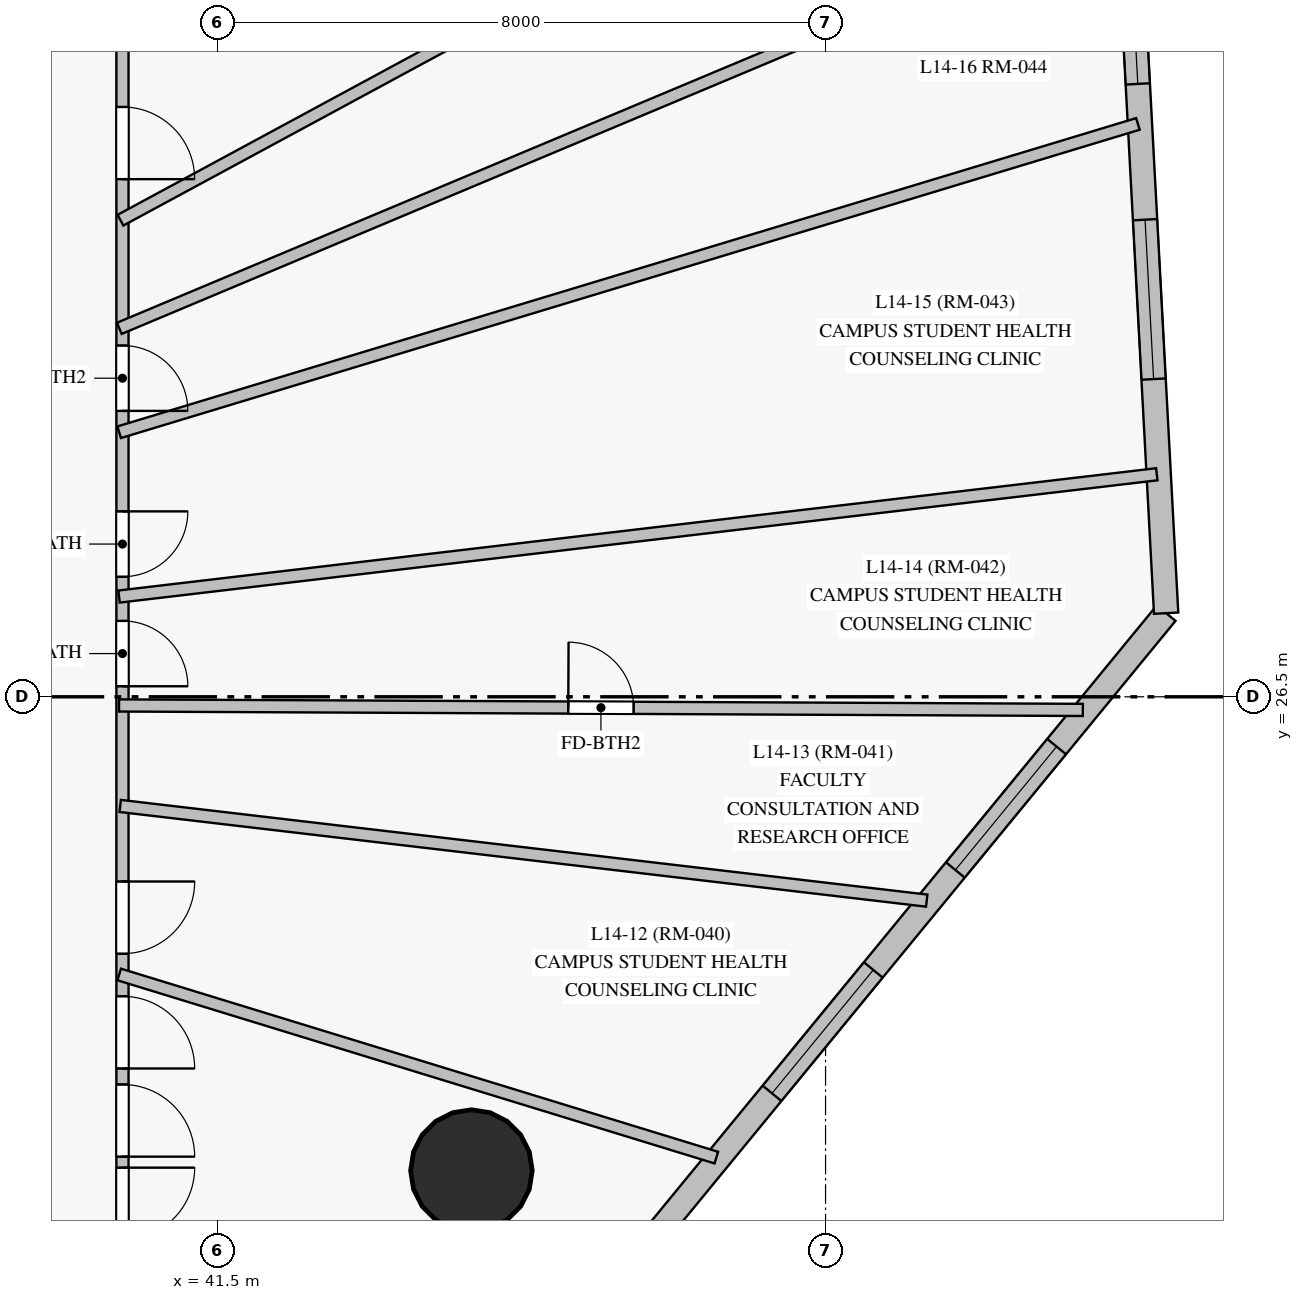
"""IFC4 building model, lengths in metres.
Left out: names, types, materials, properties, quantities, classifications, styles, units other than length and angle.
Written with IfcOpenShell. Run it as: python <this file> out.ifc"""

import sys

from ifc_helpers import new_model, si_unit, direction, frame, frame_2d, origin, origin_with_axes, origin_2d, place, context, subcontext, project, spatial, rectangle, circle, extrude, source, transform, mapped, element, fill, save


model = new_model("IFC4")
c1 = context("Model", 3, precision=1e-05, world=origin(), true_north=direction((0.0, 1.0)))
c2 = subcontext(c1, "Body", "Model", "MODEL_VIEW")
j1 = project(units=[si_unit("LENGTHUNIT", "METRE"), si_unit("PLANEANGLEUNIT", "RADIAN")], contexts=[c1])
p1 = place(None, origin())
s1 = spatial("IfcSite", under=j1, at=p1, CompositionType="ELEMENT")
p2 = place(p1, origin())
s2 = spatial("IfcBuilding", under=s1, at=p2, CompositionType="ELEMENT")
p3 = place(p2, frame((0.0, 0.0, 55.3)))
s3 = spatial("IfcBuildingStorey", under=s2, at=p3, CompositionType="ELEMENT", Elevation=55.3)
m1 = source(origin_with_axes(), c2, "Body", "SweptSolid", [
    extrude(circle(Radius=0.8, at=origin_2d()), origin(), (0.0, 0.0, 1.0), 3.6),
])
p4 = place(p3, frame((44.841, 20.267, 0.0), z_axis=(0.0, 0.0, 1.0), x_axis=(1.0, 0.0, 0.0)))
e1 = element("IfcColumn", 1, at=p4, inside=s3, PredefinedType="COLUMN", context=c2, shape_type="MappedRepresentation", body=[
    mapped(m1, transform((0.0, 0.0, 0.0), scale=1.0)),
])
p5 = place(p3, frame((44.153, 15.627, 0.0), z_axis=(0.0, 0.0, 1.0), x_axis=(0.634471173576, 0.772946524606, 0.0)))
e2 = element("IfcWall", 2, at=p5, inside=s3, PredefinedType="SOLIDWALL", context=c2, shape_type="SweptSolid", body=[
    extrude(rectangle(XDim=15.49, YDim=0.32, at=frame_2d((7.745, 0.0))), origin(), (0.0, 0.0, 1.0), 3.35),
])
p6 = place(p5, frame((2.073, 0.0, 0.85)))
e3 = element("IfcOpeningElement", 3, at=p6, cuts=e2, PredefinedType="OPENING", context=c2, shape_type="SweptSolid", body=[
    extrude(rectangle(XDim=2.1, YDim=1.95, at=frame_2d((1.05, 0.975))), frame((0.0, 0.17, 0.0), z_axis=(0.0, -1.0, 0.0), x_axis=(1.0, 0.0, 0.0)), (0.0, 0.0, 1.0), 0.34),
])
p7 = place(p5, frame((7.318, 0.0, 0.85)))
e4 = element("IfcOpeningElement", 4, at=p7, cuts=e2, PredefinedType="OPENING", context=c2, shape_type="SweptSolid", body=[
    extrude(rectangle(XDim=2.1, YDim=1.95, at=frame_2d((1.05, 0.975))), frame((0.0, 0.17, 0.0), z_axis=(0.0, -1.0, 0.0), x_axis=(1.0, 0.0, 0.0)), (0.0, 0.0, 1.0), 0.34),
])
p8 = place(p5, frame((11.119, 0.0, 0.85)))
e5 = element("IfcOpeningElement", 5, at=p8, cuts=e2, PredefinedType="OPENING", context=c2, shape_type="SweptSolid", body=[
    extrude(rectangle(XDim=2.1, YDim=1.95, at=frame_2d((1.05, 0.975))), frame((0.0, 0.17, 0.0), z_axis=(0.0, -1.0, 0.0), x_axis=(1.0, 0.0, 0.0)), (0.0, 0.0, 1.0), 0.34),
])
p9 = place(p3, frame((53.981, 27.6, 0.0), z_axis=(0.0, 0.0, 1.0), x_axis=(-0.053491775133, 0.9985682901, 0.0)))
e6 = element("IfcWall", 6, at=p9, inside=s3, PredefinedType="SOLIDWALL", context=c2, shape_type="SweptSolid", body=[
    extrude(rectangle(XDim=10.329, YDim=0.32, at=frame_2d((5.164, 0.0))), origin(), (0.0, 0.0, 1.0), 3.35),
])
p10 = place(p9, frame((3.084, 0.0, 0.85)))
e7 = element("IfcOpeningElement", 7, at=p10, cuts=e6, PredefinedType="OPENING", context=c2, shape_type="SweptSolid", body=[
    extrude(rectangle(XDim=2.1, YDim=1.95, at=frame_2d((1.05, 0.975))), frame((0.0, 0.17, 0.0), z_axis=(0.0, -1.0, 0.0), x_axis=(1.0, 0.0, 0.0)), (0.0, 0.0, 1.0), 0.34),
])
p11 = place(p9, frame((6.973, 0.0, 0.85)))
e8 = element("IfcOpeningElement", 8, at=p11, cuts=e6, PredefinedType="OPENING", context=c2, shape_type="SweptSolid", body=[
    extrude(rectangle(XDim=1.8, YDim=1.85, at=frame_2d((0.9, 0.925))), frame((0.0, 0.17, 0.0), z_axis=(0.0, -1.0, 0.0), x_axis=(1.0, 0.0, 0.0)), (0.0, 0.0, 1.0), 0.34),
])
p12 = place(p3, frame((40.25, 37.65, 0.0), z_axis=(0.0, 0.0, 1.0), x_axis=(0.0, -1.0, 0.0)))
e9 = element("IfcWall", 9, at=p12, inside=s3, PredefinedType="PARTITIONING", context=c2, shape_type="SweptSolid", body=[
    extrude(rectangle(XDim=22.3, YDim=0.16, at=frame_2d((11.15, 0.0))), origin(), (0.0, 0.0, 1.0), 2.75),
])
p13 = place(p12, frame((16.25, 0.0, 0.0)))
e10 = element("IfcOpeningElement", 10, at=p13, cuts=e9, PredefinedType="OPENING", context=c2, shape_type="SweptSolid", body=[
    extrude(rectangle(XDim=0.95, YDim=2.15, at=frame_2d((0.475, 1.075))), frame((0.0, 0.09, 0.0), z_axis=(0.0, -1.0, 0.0), x_axis=(1.0, 0.0, 0.0)), (0.0, 0.0, 1.0), 0.18),
])
p14 = place(p12, frame((13.58, 0.0, 0.0)))
e11 = element("IfcOpeningElement", 11, at=p14, cuts=e9, PredefinedType="OPENING", context=c2, shape_type="SweptSolid", body=[
    extrude(rectangle(XDim=0.95, YDim=2.15, at=frame_2d((0.475, 1.075))), frame((0.0, 0.09, 0.0), z_axis=(0.0, -1.0, 0.0), x_axis=(1.0, 0.0, 0.0)), (0.0, 0.0, 1.0), 0.18),
])
p15 = place(p12, frame((10.151, 0.0, 0.0)))
e12 = element("IfcOpeningElement", 12, at=p15, cuts=e9, PredefinedType="OPENING", context=c2, shape_type="SweptSolid", body=[
    extrude(rectangle(XDim=0.86, YDim=2.1, at=frame_2d((0.43, 1.05))), frame((0.0, 0.09, 0.0), z_axis=(0.0, -1.0, 0.0), x_axis=(1.0, 0.0, 0.0)), (0.0, 0.0, 1.0), 0.18),
])
p16 = place(p12, frame((8.711, 0.0, 0.0)))
e13 = element("IfcOpeningElement", 13, at=p16, cuts=e9, PredefinedType="OPENING", context=c2, shape_type="SweptSolid", body=[
    extrude(rectangle(XDim=0.86, YDim=2.1, at=frame_2d((0.43, 1.05))), frame((0.0, 0.09, 0.0), z_axis=(0.0, -1.0, 0.0), x_axis=(1.0, 0.0, 0.0)), (0.0, 0.0, 1.0), 0.18),
])
p17 = place(p12, frame((3.39, 0.0, 0.0)))
e14 = element("IfcOpeningElement", 14, at=p17, cuts=e9, PredefinedType="OPENING", context=c2, shape_type="SweptSolid", body=[
    extrude(rectangle(XDim=0.95, YDim=2.15, at=frame_2d((0.475, 1.075))), frame((0.0, 0.09, 0.0), z_axis=(0.0, -1.0, 0.0), x_axis=(1.0, 0.0, 0.0)), (0.0, 0.0, 1.0), 0.18),
])
p18 = place(p12, frame((0.759, 0.0, 0.0)))
e15 = element("IfcOpeningElement", 15, at=p18, cuts=e9, PredefinedType="OPENING", context=c2, shape_type="SweptSolid", body=[
    extrude(rectangle(XDim=0.86, YDim=2.1, at=frame_2d((0.43, 1.05))), frame((0.0, 0.09, 0.0), z_axis=(0.0, -1.0, 0.0), x_axis=(1.0, 0.0, 0.0)), (0.0, 0.0, 1.0), 0.18),
])
p19 = place(p12, frame((15.09, 0.0, 0.0)))
e16 = element("IfcOpeningElement", 16, at=p19, cuts=e9, PredefinedType="OPENING", context=c2, shape_type="SweptSolid", body=[
    extrude(rectangle(XDim=0.95, YDim=2.15, at=frame_2d((0.475, 1.075))), frame((0.0, 0.09, 0.0), z_axis=(0.0, -1.0, 0.0), x_axis=(1.0, 0.0, 0.0)), (0.0, 0.0, 1.0), 0.18),
])
p20 = place(p12, frame((17.345, 0.0, 0.0)))
e17 = element("IfcOpeningElement", 17, at=p20, cuts=e9, PredefinedType="OPENING", context=c2, shape_type="SweptSolid", body=[
    extrude(rectangle(XDim=0.95, YDim=2.15, at=frame_2d((0.475, 1.075))), frame((0.0, 0.09, 0.0), z_axis=(0.0, -1.0, 0.0), x_axis=(1.0, 0.0, 0.0)), (0.0, 0.0, 1.0), 0.18),
])
p21 = place(p12, frame((18.437, 0.0, 0.0)))
e18 = element("IfcOpeningElement", 18, at=p21, cuts=e9, PredefinedType="OPENING", context=c2, shape_type="SweptSolid", body=[
    extrude(rectangle(XDim=0.95, YDim=2.15, at=frame_2d((0.475, 1.075))), frame((0.0, 0.09, 0.0), z_axis=(0.0, -1.0, 0.0), x_axis=(1.0, 0.0, 0.0)), (0.0, 0.0, 1.0), 0.18),
])
p22 = place(p12, frame((6.529, 0.0, 0.0)))
e19 = element("IfcOpeningElement", 19, at=p22, cuts=e9, PredefinedType="OPENING", context=c2, shape_type="SweptSolid", body=[
    extrude(rectangle(XDim=0.86, YDim=2.04, at=frame_2d((0.43, 1.02))), frame((0.0, 0.09, 0.0), z_axis=(0.0, -1.0, 0.0), x_axis=(1.0, 0.0, 0.0)), (0.0, 0.0, 1.0), 0.18),
])
p23 = place(p3, frame((40.208, 31.347, 0.0), z_axis=(0.0, 0.0, 1.0), x_axis=(0.922132774038, 0.386873554337, 0.0)))
e20 = element("IfcWall", 20, at=p23, inside=s3, PredefinedType="PARTITIONING", context=c2, shape_type="SweptSolid", body=[
    extrude(rectangle(XDim=14.364, YDim=0.16, at=frame_2d((7.182, 0.0))), origin(), (0.0, 0.0, 1.0), 3.35),
])
p24 = place(p3, frame((40.207, 29.98, 0.0), z_axis=(0.0, 0.0, 1.0), x_axis=(0.957126698235, 0.289669610982, 0.0)))
e21 = element("IfcWall", 21, at=p24, inside=s3, PredefinedType="PARTITIONING", context=c2, shape_type="SweptSolid", body=[
    extrude(rectangle(XDim=14.003, YDim=0.16, at=frame_2d((7.001, 0.0))), origin(), (0.0, 0.0, 1.0), 3.35),
])
p25 = place(p3, frame((40.205, 27.819, 0.0), z_axis=(0.0, 0.0, 1.0), x_axis=(0.993129615967, 0.117019510723, 0.0)))
e22 = element("IfcWall", 22, at=p25, inside=s3, PredefinedType="PARTITIONING", context=c2, shape_type="SweptSolid", body=[
    extrude(rectangle(XDim=13.747, YDim=0.16, at=frame_2d((6.874, 0.0))), origin(), (0.0, 0.0, 1.0), 3.35),
])
p26 = place(p3, frame((40.224, 32.77, 0.0), z_axis=(0.0, 0.0, 1.0), x_axis=(0.879664206946, 0.47559529331, 0.0)))
e23 = element("IfcWall", 23, at=p26, inside=s3, PredefinedType="PARTITIONING", context=c2, shape_type="SweptSolid", body=[
    extrude(rectangle(XDim=13.506, YDim=0.16, at=frame_2d((6.753, 0.0))), origin(), (0.0, 0.0, 1.0), 3.35),
])
p27 = place(p26, frame((6.323, 0.0, 0.0)))
e24 = element("IfcOpeningElement", 24, at=p27, cuts=e23, PredefinedType="OPENING", context=c2, shape_type="SweptSolid", body=[
    extrude(rectangle(XDim=0.86, YDim=2.04, at=frame_2d((0.43, 1.02))), frame((0.0, 0.09, 0.0), z_axis=(0.0, -1.0, 0.0), x_axis=(1.0, 0.0, 0.0)), (0.0, 0.0, 1.0), 0.18),
])
p28 = place(p3, frame((40.205, 26.386, 0.0), z_axis=(0.0, 0.0, 1.0), x_axis=(0.999989323429, -0.004620933778, 0.0)))
e25 = element("IfcWall", 25, at=p28, inside=s3, PredefinedType="PARTITIONING", context=c2, shape_type="SweptSolid", body=[
    extrude(rectangle(XDim=12.68, YDim=0.16, at=frame_2d((6.34, 0.0))), origin(), (0.0, 0.0, 1.0), 3.35),
])
p29 = place(p28, frame((5.91, 0.0, 0.0)))
e26 = element("IfcOpeningElement", 26, at=p29, cuts=e25, PredefinedType="OPENING", context=c2, shape_type="SweptSolid", body=[
    extrude(rectangle(XDim=0.86, YDim=2.04, at=frame_2d((0.43, 1.02))), frame((0.0, 0.09, 0.0), z_axis=(0.0, -1.0, 0.0), x_axis=(1.0, 0.0, 0.0)), (0.0, 0.0, 1.0), 0.18),
])
p30 = place(p3, frame((40.22, 25.064, 0.0), z_axis=(0.0, 0.0, 1.0), x_axis=(0.993179898744, -0.116591975412, 0.0)))
e27 = element("IfcWall", 27, at=p30, inside=s3, PredefinedType="PARTITIONING", context=c2, shape_type="SweptSolid", body=[
    extrude(rectangle(XDim=10.683, YDim=0.16, at=frame_2d((5.342, 0.0))), origin(), (0.0, 0.0, 1.0), 3.35),
])
p31 = place(p3, frame((40.207, 22.847, 0.0), z_axis=(0.0, 0.0, 1.0), x_axis=(0.956045213293, -0.293219286779, 0.0)))
e28 = element("IfcWall", 28, at=p31, inside=s3, PredefinedType="PARTITIONING", context=c2, shape_type="SweptSolid", body=[
    extrude(rectangle(XDim=8.217, YDim=0.16, at=frame_2d((4.108, 0.0))), origin(), (0.0, 0.0, 1.0), 3.35),
])
m2 = source(origin_with_axes(), c2, "Body", "SweptSolid", [
    extrude(rectangle(XDim=2.1, YDim=1.95, at=frame_2d((1.05, 0.975))), frame((0.0, 0.03, 0.0), z_axis=(0.0, -1.0, 0.0), x_axis=(1.0, 0.0, 0.0)), (0.0, 0.0, 1.0), 0.06),
])
p32 = place(p7, origin())
e29 = element("IfcWindow", 29, at=p32, inside=s3, PartitioningType="SINGLE_PANEL", PredefinedType="WINDOW", context=c2, shape_type="MappedRepresentation", body=[
    mapped(m2, transform((0.0, 0.0, 0.0), scale=1.0)),
])
fill(e4, e29)
p33 = place(p8, origin())
e30 = element("IfcWindow", 30, at=p33, inside=s3, PartitioningType="SINGLE_PANEL", PredefinedType="WINDOW", context=c2, shape_type="MappedRepresentation", body=[
    mapped(m2, transform((0.0, 0.0, 0.0), scale=1.0)),
])
fill(e5, e30)
p34 = place(p10, origin())
e31 = element("IfcWindow", 31, at=p34, inside=s3, PartitioningType="SINGLE_PANEL", PredefinedType="WINDOW", context=c2, shape_type="MappedRepresentation", body=[
    mapped(m2, transform((0.0, 0.0, 0.0), scale=1.0)),
])
fill(e7, e31)
m3 = source(origin_with_axes(), c2, "Body", "SweptSolid", [
    extrude(rectangle(XDim=1.8, YDim=1.85, at=frame_2d((0.9, 0.925))), frame((0.0, 0.03, 0.0), z_axis=(0.0, -1.0, 0.0), x_axis=(1.0, 0.0, 0.0)), (0.0, 0.0, 1.0), 0.06),
])
p35 = place(p11, origin())
e32 = element("IfcWindow", 32, at=p35, inside=s3, PartitioningType="SINGLE_PANEL", PredefinedType="WINDOW", context=c2, shape_type="MappedRepresentation", body=[
    mapped(m3, transform((0.0, 0.0, 0.0), scale=1.0)),
])
fill(e8, e32)
m4 = source(origin_with_axes(), c2, "Body", "SweptSolid", [
    extrude(rectangle(XDim=0.95, YDim=2.15, at=frame_2d((0.475, 1.075))), frame((0.0, 0.025, 0.0), z_axis=(0.0, -1.0, 0.0), x_axis=(1.0, 0.0, 0.0)), (0.0, 0.0, 1.0), 0.05),
])
p36 = place(p13, origin())
e33 = element("IfcDoor", 33, at=p36, inside=s3, OperationType="SINGLE_SWING_RIGHT", PredefinedType="DOOR", context=c2, shape_type="MappedRepresentation", body=[
    mapped(m4, transform((0.0, 0.0, 0.0), scale=1.0)),
])
fill(e10, e33)
p37 = place(p14, origin())
e34 = element("IfcDoor", 34, at=p37, inside=s3, OperationType="SINGLE_SWING_LEFT", PredefinedType="DOOR", context=c2, shape_type="MappedRepresentation", body=[
    mapped(m4, transform((0.0, 0.0, 0.0), scale=1.0)),
])
fill(e11, e34)
m5 = source(origin_with_axes(), c2, "Body", "SweptSolid", [
    extrude(rectangle(XDim=0.86, YDim=2.1, at=frame_2d((0.43, 1.05))), frame((0.0, 0.025, 0.0), z_axis=(0.0, -1.0, 0.0), x_axis=(1.0, 0.0, 0.0)), (0.0, 0.0, 1.0), 0.05),
])
p38 = place(p15, origin())
e35 = element("IfcDoor", 35, at=p38, inside=s3, OperationType="SINGLE_SWING_RIGHT", PredefinedType="DOOR", context=c2, shape_type="MappedRepresentation", body=[
    mapped(m5, transform((0.0, 0.0, 0.0), scale=1.0)),
])
fill(e12, e35)
p39 = place(p16, origin())
e36 = element("IfcDoor", 36, at=p39, inside=s3, OperationType="SINGLE_SWING_LEFT", PredefinedType="DOOR", context=c2, shape_type="MappedRepresentation", body=[
    mapped(m5, transform((0.0, 0.0, 0.0), scale=1.0)),
])
fill(e13, e36)
p40 = place(p17, origin())
e37 = element("IfcDoor", 37, at=p40, inside=s3, OperationType="SINGLE_SWING_RIGHT", PredefinedType="DOOR", context=c2, shape_type="MappedRepresentation", body=[
    mapped(m4, transform((0.0, 0.0, 0.0), scale=1.0)),
])
fill(e14, e37)
p41 = place(p19, origin())
e38 = element("IfcDoor", 38, at=p41, inside=s3, OperationType="SINGLE_SWING_RIGHT", PredefinedType="DOOR", context=c2, shape_type="MappedRepresentation", body=[
    mapped(m4, transform((0.0, 0.0, 0.0), scale=1.0)),
])
fill(e16, e38)
p42 = place(p20, origin())
e39 = element("IfcDoor", 39, at=p42, inside=s3, OperationType="SINGLE_SWING_LEFT", PredefinedType="DOOR", context=c2, shape_type="MappedRepresentation", body=[
    mapped(m4, transform((0.0, 0.0, 0.0), scale=1.0)),
])
fill(e17, e39)
m6 = source(origin_with_axes(), c2, "Body", "SweptSolid", [
    extrude(rectangle(XDim=0.86, YDim=2.04, at=frame_2d((0.43, 1.02))), frame((0.0, 0.025, 0.0), z_axis=(0.0, -1.0, 0.0), x_axis=(1.0, 0.0, 0.0)), (0.0, 0.0, 1.0), 0.05),
])
p43 = place(p29, origin())
e40 = element("IfcDoor", 40, at=p43, inside=s3, OperationType="SINGLE_SWING_LEFT", PredefinedType="DOOR", context=c2, shape_type="MappedRepresentation", body=[
    mapped(m6, transform((0.0, 0.0, 0.0), scale=1.0)),
])
fill(e26, e40)
p44 = place(p22, origin())
e41 = element("IfcDoor", 41, at=p44, inside=s3, OperationType="SINGLE_SWING_RIGHT", PredefinedType="DOOR", context=c2, shape_type="MappedRepresentation", body=[
    mapped(m6, transform((0.0, 0.0, 0.0), scale=1.0)),
])
fill(e19, e41)
save(model, sys.argv[1])
